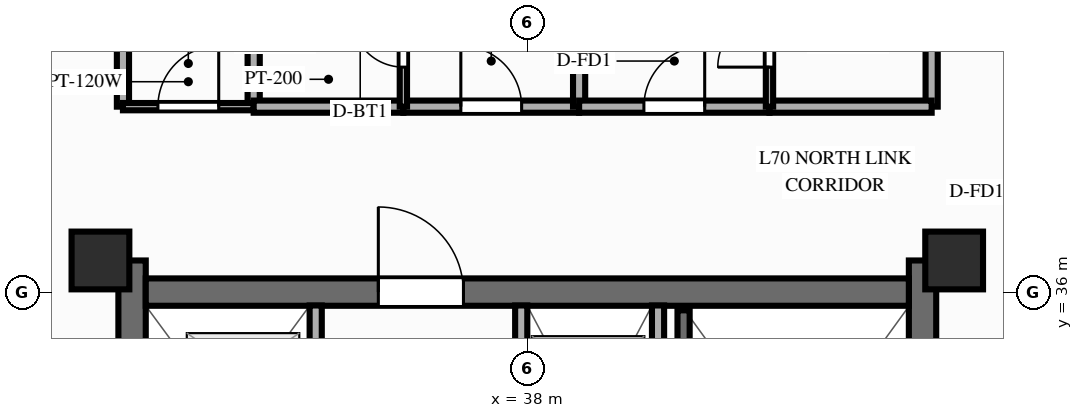
"""IFC4 building model, lengths in metres.
Left out: names, types, materials, properties, quantities, classifications, styles, units other than length and angle.
Written with IfcOpenShell. Run it as: python <this file> out.ifc"""

import sys

from ifc_helpers import new_model, si_unit, direction, frame, frame_2d, origin, origin_2d, place, context, subcontext, project, spatial, rectangle, extrude, source, transform, mapped, element, fill, save


model = new_model("IFC4")
c1 = context("Model", 3, precision=1e-05, world=origin(), true_north=direction((0.0, 1.0)))
c2 = subcontext(c1, "Body", "Model", "MODEL_VIEW")
j1 = project(units=[si_unit("LENGTHUNIT", "METRE"), si_unit("PLANEANGLEUNIT", "RADIAN")], contexts=[c1])
p1 = place(None, origin())
s1 = spatial("IfcSite", under=j1, at=p1, CompositionType="ELEMENT")
p2 = place(p1, origin())
s2 = spatial("IfcBuilding", under=s1, at=p2, CompositionType="ELEMENT")
p3 = place(p2, frame((0.0, 0.0, 226.2)))
s3 = spatial("IfcBuildingStorey", under=s2, at=p3, CompositionType="ELEMENT", Elevation=226.2)
p4 = place(p3, frame((31.5, 17.48, 0.0), z_axis=(0.0, 0.0, 1.0), x_axis=(0.0, 1.0, 0.0)))
e1 = element("IfcWall", 1, at=p4, inside=s3, PredefinedType="SHEAR", context=c2, shape_type="SweptSolid", body=[
    extrude(rectangle(XDim=19.04, YDim=0.45, at=frame_2d((9.52, 0.0))), origin(), (0.0, 0.0, 1.0), 3.9),
])
p5 = place(p4, frame((6.32, 0.0, 0.0)))
e2 = element("IfcOpeningElement", 2, at=p5, cuts=e1, PredefinedType="OPENING", context=c2, shape_type="SweptSolid", body=[
    extrude(rectangle(XDim=1.1, YDim=2.15, at=frame_2d((0.55, 1.075))), frame((0.0, 0.237, 0.0), z_axis=(0.0, -1.0, 0.0), x_axis=(1.0, 0.0, 0.0)), (0.0, 0.0, 1.0), 0.474),
])
p6 = place(p3, frame((44.5, 17.48, 0.0), z_axis=(0.0, 0.0, 1.0), x_axis=(0.0, 1.0, 0.0)))
e3 = element("IfcWall", 3, at=p6, inside=s3, PredefinedType="SHEAR", context=c2, shape_type="SweptSolid", body=[
    extrude(rectangle(XDim=19.04, YDim=0.45, at=frame_2d((9.52, 0.0))), origin(), (0.0, 0.0, 1.0), 3.9),
])
p7 = place(p6, frame((12.67, 0.0, 0.0), z_axis=(0.0, 0.0, 1.0), x_axis=(-1.0, 0.0, 0.0)))
e4 = element("IfcOpeningElement", 4, at=p7, cuts=e3, PredefinedType="OPENING", context=c2, shape_type="SweptSolid", body=[
    extrude(rectangle(XDim=1.1, YDim=2.15, at=frame_2d((0.55, 1.075))), frame((0.0, 0.237, 0.0), z_axis=(0.0, -1.0, 0.0), x_axis=(1.0, 0.0, 0.0)), (0.0, 0.0, 1.0), 0.474),
])
p8 = place(p3, frame((31.725, 36.0, 0.0), z_axis=(0.0, 0.0, 1.0), x_axis=(1.0, 0.0, 0.0)))
e5 = element("IfcWall", 5, at=p8, inside=s3, PredefinedType="SHEAR", context=c2, shape_type="SweptSolid", body=[
    extrude(rectangle(XDim=12.55, YDim=0.45, at=frame_2d((6.275, 0.0))), origin(), (0.0, 0.0, 1.0), 3.9),
])
p9 = place(p8, frame((5.225, 0.0, 0.0), z_axis=(0.0, 0.0, 1.0), x_axis=(-1.0, 0.0, 0.0)))
e6 = element("IfcOpeningElement", 6, at=p9, cuts=e5, PredefinedType="OPENING", context=c2, shape_type="SweptSolid", body=[
    extrude(rectangle(XDim=1.4, YDim=2.15, at=frame_2d((0.7, 1.075))), frame((0.0, 0.237, 0.0), z_axis=(0.0, -1.0, 0.0), x_axis=(1.0, 0.0, 0.0)), (0.0, 0.0, 1.0), 0.474),
])
m1 = source(origin(), c2, "Body", "SweptSolid", [
    extrude(rectangle(XDim=0.95, YDim=0.95, at=origin_2d()), origin(), (0.0, 0.0, 1.0), 3.9),
])
for number, where, z_axis, x_axis in (
    (7, (30.98, 36.52, 0.0), (0.0, 0.0, 1.0), (1.0, 0.0, 0.0)),
    (8, (45.02, 36.52, 0.0), (0.0, 0.0, 1.0), (1.0, 0.0, 0.0)),
):
    element("IfcColumn", number, at=place(p3, frame(where, z_axis=z_axis, x_axis=x_axis)), inside=s3, PredefinedType="COLUMN", context=c2, shape_type="MappedRepresentation", body=[
        mapped(m1, transform((0.0, 0.0, 0.0), scale=1.0)),
    ])
p10 = place(p3, frame((40.15, 31.8, 0.0), z_axis=(0.0, 0.0, 1.0), x_axis=(0.0, 1.0, 0.0)))
e9 = element("IfcWall", 9, at=p10, inside=s3, PredefinedType="PARTITIONING", context=c2, shape_type="SweptSolid", body=[
    extrude(rectangle(XDim=3.98, YDim=0.2, at=frame_2d((1.99, 0.0))), origin(), (0.0, 0.0, 1.0), 3.69),
])
p11 = place(p3, frame((40.57, 28.65, 0.0), z_axis=(0.0, 0.0, 1.0), x_axis=(0.0, 1.0, 0.0)))
e10 = element("IfcWall", 10, at=p11, inside=s3, PredefinedType="SOLIDWALL", context=c2, shape_type="SweptSolid", body=[
    extrude(rectangle(XDim=7.05, YDim=0.2, at=frame_2d((3.525, 0.0))), origin(), (0.0, 0.0, 1.0), 3.69),
])
p12 = place(p3, frame((34.52, 25.44, 0.0), z_axis=(0.0, 0.0, 1.0), x_axis=(0.0, 1.0, 0.0)))
e11 = element("IfcWall", 11, at=p12, inside=s3, PredefinedType="PARTITIONING", context=c2, shape_type="SweptSolid", body=[
    extrude(rectangle(XDim=10.34, YDim=0.2, at=frame_2d((5.17, 0.0))), origin(), (0.0, 0.0, 1.0), 3.69),
])
p13 = place(p12, frame((2.6, 0.0, 0.0)))
e12 = element("IfcOpeningElement", 12, at=p13, cuts=e11, PredefinedType="OPENING", context=c2, shape_type="SweptSolid", body=[
    extrude(rectangle(XDim=0.9, YDim=2.1, at=frame_2d((0.45, 1.05))), frame((0.0, 0.112, 0.0), z_axis=(0.0, -1.0, 0.0), x_axis=(1.0, 0.0, 0.0)), (0.0, 0.0, 1.0), 0.224),
])
p14 = place(p12, frame((7.01, 0.0, 0.0)))
e13 = element("IfcOpeningElement", 13, at=p14, cuts=e11, PredefinedType="OPENING", context=c2, shape_type="SweptSolid", body=[
    extrude(rectangle(XDim=1.0, YDim=2.15, at=frame_2d((0.5, 1.075))), frame((0.0, 0.112, 0.0), z_axis=(0.0, -1.0, 0.0), x_axis=(1.0, 0.0, 0.0)), (0.0, 0.0, 1.0), 0.224),
])
p15 = place(p12, frame((8.76, 0.0, 0.0)))
e14 = element("IfcOpeningElement", 14, at=p15, cuts=e11, PredefinedType="OPENING", context=c2, shape_type="SweptSolid", body=[
    extrude(rectangle(XDim=1.0, YDim=2.15, at=frame_2d((0.5, 1.075))), frame((0.0, 0.112, 0.0), z_axis=(0.0, -1.0, 0.0), x_axis=(1.0, 0.0, 0.0)), (0.0, 0.0, 1.0), 0.224),
])
p16 = place(p3, frame((37.9, 25.44, 0.0), z_axis=(0.0, 0.0, 1.0), x_axis=(0.0, 1.0, 0.0)))
e15 = element("IfcWall", 15, at=p16, inside=s3, PredefinedType="PARTITIONING", context=c2, shape_type="SweptSolid", body=[
    extrude(rectangle(XDim=10.34, YDim=0.2, at=frame_2d((5.17, 0.0))), origin(), (0.0, 0.0, 1.0), 3.69),
])
p17 = place(p16, frame((2.6, 0.0, 0.0)))
e16 = element("IfcOpeningElement", 16, at=p17, cuts=e15, PredefinedType="OPENING", context=c2, shape_type="SweptSolid", body=[
    extrude(rectangle(XDim=0.9, YDim=2.1, at=frame_2d((0.45, 1.05))), frame((0.0, 0.112, 0.0), z_axis=(0.0, -1.0, 0.0), x_axis=(1.0, 0.0, 0.0)), (0.0, 0.0, 1.0), 0.224),
])
p18 = place(p16, frame((6.86, 0.0, 0.0)))
e17 = element("IfcOpeningElement", 17, at=p18, cuts=e15, PredefinedType="OPENING", context=c2, shape_type="SweptSolid", body=[
    extrude(rectangle(XDim=1.0, YDim=2.15, at=frame_2d((0.5, 1.075))), frame((0.0, 0.112, 0.0), z_axis=(0.0, -1.0, 0.0), x_axis=(1.0, 0.0, 0.0)), (0.0, 0.0, 1.0), 0.224),
])
p19 = place(p16, frame((8.71, 0.0, 0.0)))
e18 = element("IfcOpeningElement", 18, at=p19, cuts=e15, PredefinedType="OPENING", context=c2, shape_type="SweptSolid", body=[
    extrude(rectangle(XDim=1.0, YDim=2.15, at=frame_2d((0.5, 1.075))), frame((0.0, 0.112, 0.0), z_axis=(0.0, -1.0, 0.0), x_axis=(1.0, 0.0, 0.0)), (0.0, 0.0, 1.0), 0.224),
])
for number, where, z_axis, x_axis in (
    (19, (31.35, 39.05, 0.0), (0.0, 0.0, 1.0), (0.0, 1.0, 0.0)),
    (20, (44.65, 39.05, 0.0), (0.0, 0.0, 1.0), (0.0, 1.0, 0.0)),
):
    element("IfcWall", number, at=place(p3, frame(where, z_axis=z_axis, x_axis=x_axis)), inside=s3, PredefinedType="PARTITIONING", context=c2, shape_type="SweptSolid", body=[
        extrude(rectangle(XDim=8.8, YDim=0.2, at=frame_2d((4.4, 0.0))), origin(), (0.0, 0.0, 1.0), 2.79),
    ])
p20 = place(p3, frame((33.5, 39.05, 0.0), z_axis=(0.0, 0.0, 1.0), x_axis=(0.0, 1.0, 0.0)))
e21 = element("IfcWall", 21, at=p20, inside=s3, PredefinedType="PARTITIONING", context=c2, shape_type="SweptSolid", body=[
    extrude(rectangle(XDim=8.8, YDim=0.2, at=frame_2d((4.4, 0.0))), origin(), (0.0, 0.0, 1.0), 3.69),
])
p21 = place(p3, frame((31.35, 39.05, 0.0), z_axis=(0.0, 0.0, 1.0), x_axis=(1.0, 0.0, 0.0)))
e22 = element("IfcWall", 22, at=p21, inside=s3, PredefinedType="PARTITIONING", context=c2, shape_type="SweptSolid", body=[
    extrude(rectangle(XDim=2.15, YDim=0.12, at=frame_2d((1.075, 0.0))), origin(), (0.0, 0.0, 1.0), 3.69),
])
p22 = place(p21, frame((0.575, 0.0, 0.0)))
e23 = element("IfcOpeningElement", 23, at=p22, cuts=e22, PredefinedType="OPENING", context=c2, shape_type="SweptSolid", body=[
    extrude(rectangle(XDim=1.0, YDim=2.1, at=frame_2d((0.5, 1.05))), frame((0.0, 0.072, 0.0), z_axis=(0.0, -1.0, 0.0), x_axis=(1.0, 0.0, 0.0)), (0.0, 0.0, 1.0), 0.144),
])
p23 = place(p3, frame((33.5, 39.05, 0.0), z_axis=(0.0, 0.0, 1.0), x_axis=(1.0, 0.0, 0.0)))
e24 = element("IfcWall", 24, at=p23, inside=s3, PredefinedType="PARTITIONING", context=c2, shape_type="SweptSolid", body=[
    extrude(rectangle(XDim=2.462, YDim=0.2, at=frame_2d((1.231, 0.0))), origin(), (0.0, 0.0, 1.0), 3.69),
])
p24 = place(p3, frame((35.962, 39.05, 0.0), z_axis=(0.0, 0.0, 1.0), x_axis=(1.0, 0.0, 0.0)))
e25 = element("IfcWall", 25, at=p24, inside=s3, PredefinedType="PARTITIONING", context=c2, shape_type="SweptSolid", body=[
    extrude(rectangle(XDim=2.89, YDim=0.2, at=frame_2d((1.445, 0.0))), origin(), (0.0, 0.0, 1.0), 3.69),
])
p25 = place(p24, frame((0.945, 0.0, 0.0)))
e26 = element("IfcOpeningElement", 26, at=p25, cuts=e25, PredefinedType="OPENING", context=c2, shape_type="SweptSolid", body=[
    extrude(rectangle(XDim=1.0, YDim=2.15, at=frame_2d((0.5, 1.075))), frame((0.0, 0.112, 0.0), z_axis=(0.0, -1.0, 0.0), x_axis=(1.0, 0.0, 0.0)), (0.0, 0.0, 1.0), 0.224),
])
p26 = place(p3, frame((35.962, 39.05, 0.0), z_axis=(0.0, 0.0, 1.0), x_axis=(0.0, 1.0, 0.0)))
e27 = element("IfcWall", 27, at=p26, inside=s3, PredefinedType="PARTITIONING", context=c2, shape_type="SweptSolid", body=[
    extrude(rectangle(XDim=2.15, YDim=0.12, at=frame_2d((1.075, 0.0))), origin(), (0.0, 0.0, 1.0), 3.69),
])
p27 = place(p26, frame((0.65, 0.0, 0.0)))
e28 = element("IfcOpeningElement", 28, at=p27, cuts=e27, PredefinedType="OPENING", context=c2, shape_type="SweptSolid", body=[
    extrude(rectangle(XDim=0.85, YDim=2.05, at=frame_2d((0.425, 1.025))), frame((0.0, 0.072, 0.0), z_axis=(0.0, -1.0, 0.0), x_axis=(1.0, 0.0, 0.0)), (0.0, 0.0, 1.0), 0.144),
])
p28 = place(p3, frame((38.852, 39.05, 0.0), z_axis=(0.0, 0.0, 1.0), x_axis=(0.0, 1.0, 0.0)))
e29 = element("IfcWall", 29, at=p28, inside=s3, PredefinedType="PARTITIONING", context=c2, shape_type="SweptSolid", body=[
    extrude(rectangle(XDim=8.8, YDim=0.2, at=frame_2d((4.4, 0.0))), origin(), (0.0, 0.0, 1.0), 3.69),
])
p29 = place(p3, frame((38.852, 39.05, 0.0), z_axis=(0.0, 0.0, 1.0), x_axis=(1.0, 0.0, 0.0)))
e30 = element("IfcWall", 30, at=p29, inside=s3, PredefinedType="PARTITIONING", context=c2, shape_type="SweptSolid", body=[
    extrude(rectangle(XDim=3.131, YDim=0.2, at=frame_2d((1.565, 0.0))), origin(), (0.0, 0.0, 1.0), 3.69),
])
p30 = place(p29, frame((1.065, 0.0, 0.0)))
e31 = element("IfcOpeningElement", 31, at=p30, cuts=e30, PredefinedType="OPENING", context=c2, shape_type="SweptSolid", body=[
    extrude(rectangle(XDim=1.0, YDim=2.15, at=frame_2d((0.5, 1.075))), frame((0.0, 0.112, 0.0), z_axis=(0.0, -1.0, 0.0), x_axis=(1.0, 0.0, 0.0)), (0.0, 0.0, 1.0), 0.224),
])
p31 = place(p3, frame((41.983, 39.05, 0.0), z_axis=(0.0, 0.0, 1.0), x_axis=(1.0, 0.0, 0.0)))
e32 = element("IfcWall", 32, at=p31, inside=s3, PredefinedType="PARTITIONING", context=c2, shape_type="SweptSolid", body=[
    extrude(rectangle(XDim=2.667, YDim=0.2, at=frame_2d((1.333, 0.0))), origin(), (0.0, 0.0, 1.0), 3.69),
])
p32 = place(p3, frame((41.983, 39.05, 0.0), z_axis=(0.0, 0.0, 1.0), x_axis=(0.0, 1.0, 0.0)))
e33 = element("IfcWall", 33, at=p32, inside=s3, PredefinedType="PARTITIONING", context=c2, shape_type="SweptSolid", body=[
    extrude(rectangle(XDim=2.15, YDim=0.12, at=frame_2d((1.075, 0.0))), origin(), (0.0, 0.0, 1.0), 3.69),
])
p33 = place(p32, frame((0.65, 0.0, 0.0)))
e34 = element("IfcOpeningElement", 34, at=p33, cuts=e33, PredefinedType="OPENING", context=c2, shape_type="SweptSolid", body=[
    extrude(rectangle(XDim=0.85, YDim=2.05, at=frame_2d((0.425, 1.025))), frame((0.0, 0.072, 0.0), z_axis=(0.0, -1.0, 0.0), x_axis=(1.0, 0.0, 0.0)), (0.0, 0.0, 1.0), 0.144),
])
m2 = source(origin(), c2, "Body", "SweptSolid", [
    extrude(rectangle(XDim=1.4, YDim=2.15, at=frame_2d((0.7, 1.075))), frame((0.0, 0.025, 0.0), z_axis=(0.0, -1.0, 0.0), x_axis=(1.0, 0.0, 0.0)), (0.0, 0.0, 1.0), 0.05),
])
p34 = place(p9, origin())
e35 = element("IfcDoor", 35, at=p34, inside=s3, OperationType="SINGLE_SWING_RIGHT", PredefinedType="DOOR", context=c2, shape_type="MappedRepresentation", body=[
    mapped(m2, transform((0.0, 0.0, 0.0), scale=1.0)),
])
fill(e6, e35)
m3 = source(origin(), c2, "Body", "SweptSolid", [
    extrude(rectangle(XDim=1.0, YDim=2.1, at=frame_2d((0.5, 1.05))), frame((0.0, 0.025, 0.0), z_axis=(0.0, -1.0, 0.0), x_axis=(1.0, 0.0, 0.0)), (0.0, 0.0, 1.0), 0.05),
])
p35 = place(p22, origin())
e36 = element("IfcDoor", 36, at=p35, inside=s3, OperationType="SINGLE_SWING_RIGHT", PredefinedType="DOOR", context=c2, shape_type="MappedRepresentation", body=[
    mapped(m3, transform((0.0, 0.0, 0.0), scale=1.0)),
])
fill(e23, e36)
m4 = source(origin(), c2, "Body", "SweptSolid", [
    extrude(rectangle(XDim=1.0, YDim=2.15, at=frame_2d((0.5, 1.075))), frame((0.0, 0.025, 0.0), z_axis=(0.0, -1.0, 0.0), x_axis=(1.0, 0.0, 0.0)), (0.0, 0.0, 1.0), 0.05),
])
p36 = place(p25, origin())
e37 = element("IfcDoor", 37, at=p36, inside=s3, OperationType="SINGLE_SWING_LEFT", PredefinedType="DOOR", context=c2, shape_type="MappedRepresentation", body=[
    mapped(m4, transform((0.0, 0.0, 0.0), scale=1.0)),
])
fill(e26, e37)
m5 = source(origin(), c2, "Body", "SweptSolid", [
    extrude(rectangle(XDim=0.85, YDim=2.05, at=frame_2d((0.425, 1.025))), frame((0.0, 0.025, 0.0), z_axis=(0.0, -1.0, 0.0), x_axis=(1.0, 0.0, 0.0)), (0.0, 0.0, 1.0), 0.05),
])
p37 = place(p27, origin())
e38 = element("IfcDoor", 38, at=p37, inside=s3, OperationType="SINGLE_SWING_RIGHT", PredefinedType="DOOR", context=c2, shape_type="MappedRepresentation", body=[
    mapped(m5, transform((0.0, 0.0, 0.0), scale=1.0)),
])
fill(e28, e38)
p38 = place(p30, origin())
e39 = element("IfcDoor", 39, at=p38, inside=s3, OperationType="SINGLE_SWING_RIGHT", PredefinedType="DOOR", context=c2, shape_type="MappedRepresentation", body=[
    mapped(m4, transform((0.0, 0.0, 0.0), scale=1.0)),
])
fill(e31, e39)
p39 = place(p33, origin())
e40 = element("IfcDoor", 40, at=p39, inside=s3, OperationType="SINGLE_SWING_LEFT", PredefinedType="DOOR", context=c2, shape_type="MappedRepresentation", body=[
    mapped(m5, transform((0.0, 0.0, 0.0), scale=1.0)),
])
fill(e34, e40)
save(model, sys.argv[1])
